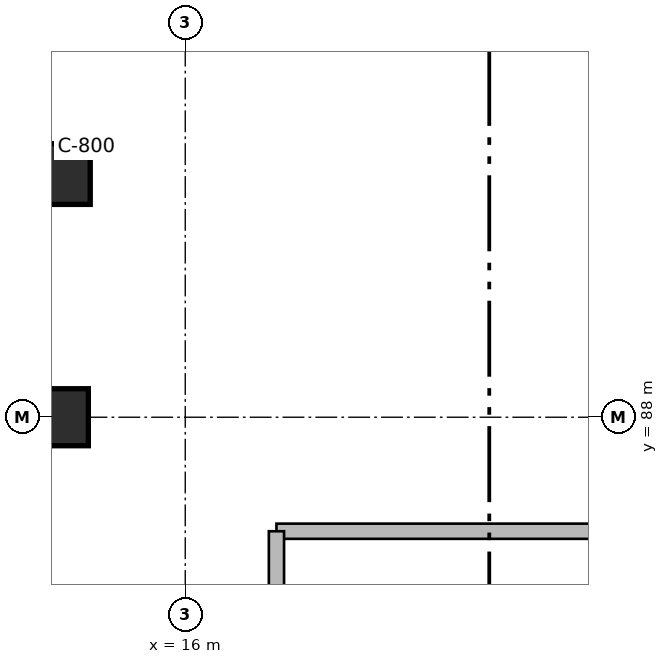
"""IFC4 building model, lengths in metres.
Left out: names, types, materials, properties, quantities, classifications, styles, units other than length and angle.
Written with IfcOpenShell. Run it as: python <this file> out.ifc"""

import sys

from ifc_helpers import new_model, si_unit, direction, frame, frame_2d, origin, origin_2d, place, context, subcontext, project, spatial, rectangle, extrude, element, save


model = new_model("IFC4")
c1 = context("Model", 3, precision=1e-05, world=origin(), true_north=direction((0.0, 1.0)))
c2 = subcontext(c1, "Body", "Model", "MODEL_VIEW")
j1 = project(units=[si_unit("LENGTHUNIT", "METRE"), si_unit("PLANEANGLEUNIT", "RADIAN")], contexts=[c1])
p1 = place(None, origin())
s1 = spatial("IfcSite", under=j1, at=p1, CompositionType="ELEMENT")
p2 = place(p1, origin())
s2 = spatial("IfcBuilding", under=s1, at=p2, CompositionType="ELEMENT")
p3 = place(p2, frame((0.0, 0.0, -3.84)))
s3 = spatial("IfcBuildingStorey", under=s2, at=p3, CompositionType="ELEMENT", Elevation=-3.84)
p4 = place(p3, frame((14.35, 88.0, 0.0), z_axis=(0.0, 0.0, 1.0), x_axis=(1.0, 0.0, 0.0)))
e1 = element("IfcColumn", 1, at=p4, inside=s3, PredefinedType="COLUMN", context=c2, shape_type="SweptSolid", body=[
    extrude(rectangle(XDim=0.75, YDim=0.75, at=origin_2d()), origin(), (0.0, 0.0, 1.0), 3.84),
])
p5 = place(p3, frame((14.35, 91.2, 0.0), z_axis=(0.0, 0.0, 1.0), x_axis=(1.0, 0.0, 0.0)))
e2 = element("IfcColumn", 2, at=p5, inside=s3, PredefinedType="COLUMN", context=c2, shape_type="SweptSolid", body=[
    extrude(rectangle(XDim=0.8, YDim=0.8, at=origin_2d()), origin(), (0.0, 0.0, 1.0), 3.84),
])
p6 = place(p3, frame((26.5, 86.5, 0.0), z_axis=(0.0, 0.0, 1.0), x_axis=(-1.0, 0.0, 0.0)))
e3 = element("IfcWall", 3, at=p6, inside=s3, PredefinedType="SOLIDWALL", context=c2, shape_type="SweptSolid", body=[
    extrude(rectangle(XDim=9.3, YDim=0.2, at=frame_2d((4.65, 0.0))), origin(), (0.0, 0.0, 1.0), 3.52),
])
p7 = place(p6, frame((4.15, 0.0, 0.0)))
e4 = element("IfcOpeningElement", 4, at=p7, cuts=e3, PredefinedType="OPENING", context=c2, shape_type="SweptSolid", body=[
    extrude(rectangle(XDim=1.0, YDim=2.1, at=frame_2d((0.5, 1.05))), frame((0.0, 0.11, 0.0), z_axis=(0.0, -1.0, 0.0), x_axis=(1.0, 0.0, 0.0)), (0.0, 0.0, 1.0), 0.22),
])
p8 = place(p3, frame((17.2, 86.5, 0.0), z_axis=(0.0, 0.0, 1.0), x_axis=(0.0, -1.0, 0.0)))
e5 = element("IfcWall", 5, at=p8, inside=s3, PredefinedType="SOLIDWALL", context=c2, shape_type="SweptSolid", body=[
    extrude(rectangle(XDim=9.3, YDim=0.2, at=frame_2d((4.65, 0.0))), origin(), (0.0, 0.0, 1.0), 3.52),
])
save(model, sys.argv[1])
